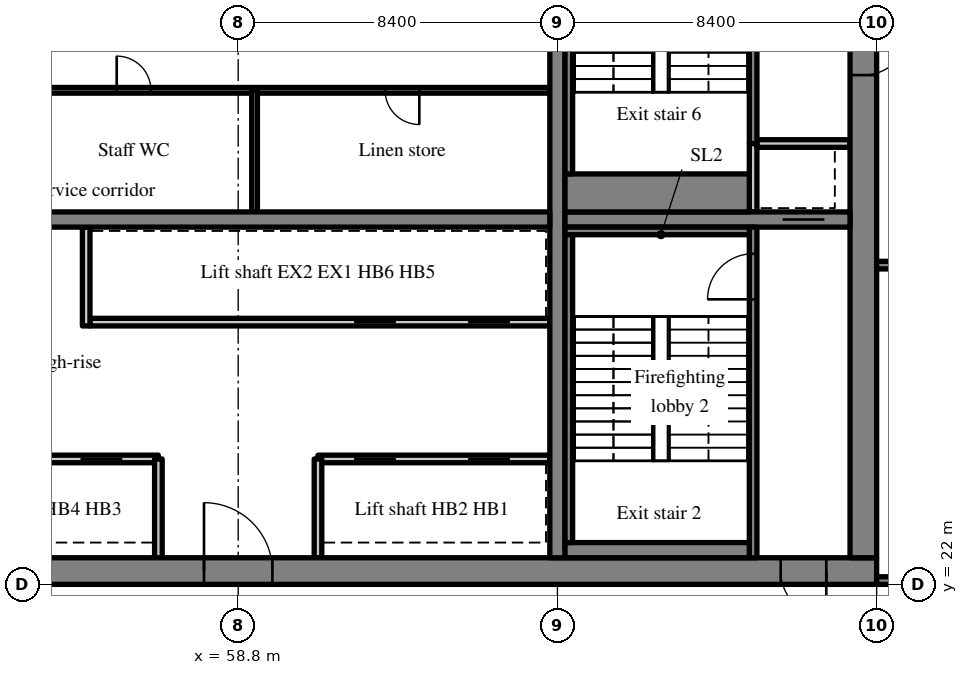
"""IFC4 building model, lengths in metres.
Left out: names, types, materials, properties, quantities, classifications, styles, units other than length and angle.
Written with IfcOpenShell. Run it as: python <this file> out.ifc"""

import sys

from ifc_helpers import new_model, si_unit, direction, frame, frame_2d, origin, place, context, subcontext, project, spatial, rectangle, extrude, source, transform, mapped, element, fill, save


model = new_model("IFC4")
c1 = context("Model", 3, precision=1e-05, world=origin(), true_north=direction((0.0, 1.0)))
c2 = subcontext(c1, "Body", "Model", "MODEL_VIEW")
j1 = project(units=[si_unit("LENGTHUNIT", "METRE"), si_unit("PLANEANGLEUNIT", "RADIAN")], contexts=[c1])
p1 = place(None, origin())
s1 = spatial("IfcSite", under=j1, at=p1, CompositionType="ELEMENT")
p2 = place(p1, origin())
s2 = spatial("IfcBuilding", under=s1, at=p2, CompositionType="ELEMENT")
p3 = place(p2, frame((0.0, 0.0, 151.6)))
s3 = spatial("IfcBuildingStorey", under=s2, at=p3, CompositionType="ELEMENT", Elevation=151.6)
m1 = source(origin(), c2, "Body", "SweptSolid", [
    extrude(rectangle(XDim=50.4, YDim=0.7, at=frame_2d((25.2, 0.0))), origin(), (0.0, 0.0, 1.0), 3.52),
])
p4 = place(p3, frame((25.2, 22.35, 0.0), z_axis=(0.0, 0.0, 1.0), x_axis=(1.0, 0.0, 0.0)))
e1 = element("IfcWall", 1, at=p4, inside=s3, PredefinedType="SHEAR", context=c2, shape_type="MappedRepresentation", body=[
    mapped(m1, transform((0.0, 0.0, 0.0), scale=1.0)),
])
m2 = source(origin(), c2, "Body", "SweptSolid", [
    extrude(rectangle(XDim=1.8, YDim=2.1, at=frame_2d((0.9, 1.05))), frame((0.0, 0.36, 0.0), z_axis=(0.0, -1.0, 0.0), x_axis=(1.0, 0.0, 0.0)), (0.0, 0.0, 1.0), 0.72),
])
p5 = place(p4, frame((15.9, 0.0, 0.0)))
e2 = element("IfcOpeningElement", 2, at=p5, cuts=e1, PredefinedType="OPENING", context=c2, shape_type="MappedRepresentation", body=[
    mapped(m2, transform((0.0, 0.0, 0.0), scale=1.0)),
])
m3 = source(origin(), c2, "Body", "SweptSolid", [
    extrude(rectangle(XDim=0.9, YDim=2.1, at=frame_2d((0.45, 1.05))), frame((0.0, 0.36, 0.0), z_axis=(0.0, -1.0, 0.0), x_axis=(1.0, 0.0, 0.0)), (0.0, 0.0, 1.0), 0.72),
])
p6 = place(p4, frame((21.5, 0.0, 0.0)))
e3 = element("IfcOpeningElement", 3, at=p6, cuts=e1, PredefinedType="OPENING", context=c2, shape_type="MappedRepresentation", body=[
    mapped(m3, transform((0.0, 0.0, 0.0), scale=1.0)),
])
p7 = place(p4, frame((32.7, 0.0, 0.0)))
e4 = element("IfcOpeningElement", 4, at=p7, cuts=e1, PredefinedType="OPENING", context=c2, shape_type="MappedRepresentation", body=[
    mapped(m2, transform((0.0, 0.0, 0.0), scale=1.0)),
])
m4 = source(origin(), c2, "Body", "SweptSolid", [
    extrude(rectangle(XDim=1.2, YDim=2.1, at=frame_2d((0.6, 1.05))), frame((0.0, 0.36, 0.0), z_axis=(0.0, -1.0, 0.0), x_axis=(1.0, 0.0, 0.0)), (0.0, 0.0, 1.0), 0.72),
])
p8 = place(p4, frame((6.475, 0.0, 0.0)))
e5 = element("IfcOpeningElement", 5, at=p8, cuts=e1, PredefinedType="OPENING", context=c2, shape_type="MappedRepresentation", body=[
    mapped(m4, transform((0.0, 0.0, 0.0), scale=1.0)),
])
p9 = place(p4, frame((47.875, 0.0, 0.0)))
e6 = element("IfcOpeningElement", 6, at=p9, cuts=e1, PredefinedType="OPENING", context=c2, shape_type="MappedRepresentation", body=[
    mapped(m4, transform((0.0, 0.0, 0.0), scale=1.0)),
])
m5 = source(origin(), c2, "Body", "SweptSolid", [
    extrude(rectangle(XDim=18.6, YDim=0.7, at=frame_2d((9.3, 0.0))), origin(), (0.0, 0.0, 1.0), 3.52),
])
p10 = place(p3, frame((75.25, 22.7, 0.0), z_axis=(0.0, 0.0, 1.0), x_axis=(0.0, 1.0, 0.0)))
e7 = element("IfcWall", 7, at=p10, inside=s3, PredefinedType="SHEAR", context=c2, shape_type="MappedRepresentation", body=[
    mapped(m5, transform((0.0, 0.0, 0.0), scale=1.0)),
])
p11 = place(p10, frame((12.7, 0.0, 0.0)))
e8 = element("IfcOpeningElement", 8, at=p11, cuts=e7, PredefinedType="OPENING", context=c2, shape_type="MappedRepresentation", body=[
    mapped(m4, transform((0.0, 0.0, 0.0), scale=1.0)),
])
m6 = source(origin(), c2, "Body", "SweptSolid", [
    extrude(rectangle(XDim=18.6, YDim=0.4, at=frame_2d((9.3, 0.0))), origin(), (0.0, 0.0, 1.0), 3.52),
])
p12 = place(p3, frame((67.2, 22.7, 0.0), z_axis=(0.0, 0.0, 1.0), x_axis=(0.0, 1.0, 0.0)))
e9 = element("IfcWall", 9, at=p12, inside=s3, PredefinedType="SHEAR", context=c2, shape_type="MappedRepresentation", body=[
    mapped(m6, transform((0.0, 0.0, 0.0), scale=1.0)),
])
m7 = source(origin(), c2, "Body", "SweptSolid", [
    extrude(rectangle(XDim=16.4, YDim=0.4, at=frame_2d((8.2, 0.0))), origin(), (0.0, 0.0, 1.0), 3.52),
])
p13 = place(p3, frame((50.6, 31.6, 0.0), z_axis=(0.0, 0.0, 1.0), x_axis=(1.0, 0.0, 0.0)))
e10 = element("IfcWall", 10, at=p13, inside=s3, PredefinedType="SHEAR", context=c2, shape_type="MappedRepresentation", body=[
    mapped(m7, transform((0.0, 0.0, 0.0), scale=1.0)),
])
m8 = source(origin(), c2, "Body", "SweptSolid", [
    extrude(rectangle(XDim=1.0, YDim=2.1, at=frame_2d((0.5, 1.05))), frame((0.0, 0.21, 0.0), z_axis=(0.0, -1.0, 0.0), x_axis=(1.0, 0.0, 0.0)), (0.0, 0.0, 1.0), 0.42),
])
p14 = place(p13, frame((0.6, 0.0, 0.0)))
e11 = element("IfcOpeningElement", 11, at=p14, cuts=e10, PredefinedType="OPENING", context=c2, shape_type="MappedRepresentation", body=[
    mapped(m8, transform((0.0, 0.0, 0.0), scale=1.0)),
])
m9 = source(origin(), c2, "Body", "SweptSolid", [
    extrude(rectangle(XDim=7.5, YDim=0.4, at=frame_2d((3.75, 0.0))), origin(), (0.0, 0.0, 1.0), 3.52),
])
p15 = place(p3, frame((67.4, 31.6, 0.0), z_axis=(0.0, 0.0, 1.0), x_axis=(1.0, 0.0, 0.0)))
e12 = element("IfcWall", 12, at=p15, inside=s3, PredefinedType="SHEAR", context=c2, shape_type="MappedRepresentation", body=[
    mapped(m9, transform((0.0, 0.0, 0.0), scale=1.0)),
])
m10 = source(origin(), c2, "Body", "SweptSolid", [
    extrude(rectangle(XDim=1.1, YDim=2.1, at=frame_2d((0.55, 1.05))), frame((0.0, 0.21, 0.0), z_axis=(0.0, -1.0, 0.0), x_axis=(1.0, 0.0, 0.0)), (0.0, 0.0, 1.0), 0.42),
])
p16 = place(p15, frame((5.725, 0.0, 0.0)))
e13 = element("IfcOpeningElement", 13, at=p16, cuts=e12, PredefinedType="OPENING", context=c2, shape_type="MappedRepresentation", body=[
    mapped(m10, transform((0.0, 0.0, 0.0), scale=1.0)),
])
m11 = source(origin(), c2, "Body", "SweptSolid", [
    extrude(rectangle(XDim=6.1, YDim=0.2, at=frame_2d((3.05, 0.0))), origin(), (0.0, 0.0, 1.0), 3.52),
])
p17 = place(p3, frame((67.0, 25.3, 0.0), z_axis=(0.0, 0.0, 1.0), x_axis=(-1.0, 0.0, 0.0)))
e14 = element("IfcWall", 14, at=p17, inside=s3, PredefinedType="SOLIDWALL", context=c2, shape_type="MappedRepresentation", body=[
    mapped(m11, transform((0.0, 0.0, 0.0), scale=1.0)),
])
m12 = source(origin(), c2, "Body", "SweptSolid", [
    extrude(rectangle(XDim=1.1, YDim=2.1, at=frame_2d((0.55, 1.05))), frame((0.0, 0.11, 0.0), z_axis=(0.0, -1.0, 0.0), x_axis=(1.0, 0.0, 0.0)), (0.0, 0.0, 1.0), 0.22),
])
p18 = place(p17, frame((1.05, 0.0, 0.0)))
e15 = element("IfcOpeningElement", 15, at=p18, cuts=e14, PredefinedType="OPENING", context=c2, shape_type="MappedRepresentation", body=[
    mapped(m12, transform((0.0, 0.0, 0.0), scale=1.0)),
])
p19 = place(p17, frame((4.05, 0.0, 0.0)))
e16 = element("IfcOpeningElement", 16, at=p19, cuts=e14, PredefinedType="OPENING", context=c2, shape_type="MappedRepresentation", body=[
    mapped(m12, transform((0.0, 0.0, 0.0), scale=1.0)),
])
m13 = source(origin(), c2, "Body", "SweptSolid", [
    extrude(rectangle(XDim=6.0, YDim=0.2, at=frame_2d((3.0, 0.0))), origin(), (0.0, 0.0, 1.0), 3.52),
])
p20 = place(p3, frame((56.7, 25.3, 0.0), z_axis=(0.0, 0.0, 1.0), x_axis=(-1.0, 0.0, 0.0)))
e17 = element("IfcWall", 17, at=p20, inside=s3, PredefinedType="SOLIDWALL", context=c2, shape_type="MappedRepresentation", body=[
    mapped(m13, transform((0.0, 0.0, 0.0), scale=1.0)),
])
p21 = place(p20, frame((0.95, 0.0, 0.0)))
e18 = element("IfcOpeningElement", 18, at=p21, cuts=e17, PredefinedType="OPENING", context=c2, shape_type="MappedRepresentation", body=[
    mapped(m12, transform((0.0, 0.0, 0.0), scale=1.0)),
])
p22 = place(p20, frame((3.95, 0.0, 0.0)))
e19 = element("IfcOpeningElement", 19, at=p22, cuts=e17, PredefinedType="OPENING", context=c2, shape_type="MappedRepresentation", body=[
    mapped(m12, transform((0.0, 0.0, 0.0), scale=1.0)),
])
m14 = source(origin(), c2, "Body", "SweptSolid", [
    extrude(rectangle(XDim=12.1, YDim=0.2, at=frame_2d((6.05, 0.0))), origin(), (0.0, 0.0, 1.0), 3.52),
])
p23 = place(p3, frame((67.0, 28.9, 0.0), z_axis=(0.0, 0.0, 1.0), x_axis=(-1.0, 0.0, 0.0)))
e20 = element("IfcWall", 20, at=p23, inside=s3, PredefinedType="SOLIDWALL", context=c2, shape_type="MappedRepresentation", body=[
    mapped(m14, transform((0.0, 0.0, 0.0), scale=1.0)),
])
p24 = place(p23, frame((1.05, 0.0, 0.0)))
e21 = element("IfcOpeningElement", 21, at=p24, cuts=e20, PredefinedType="OPENING", context=c2, shape_type="MappedRepresentation", body=[
    mapped(m12, transform((0.0, 0.0, 0.0), scale=1.0)),
])
p25 = place(p23, frame((4.05, 0.0, 0.0)))
e22 = element("IfcOpeningElement", 22, at=p25, cuts=e20, PredefinedType="OPENING", context=c2, shape_type="MappedRepresentation", body=[
    mapped(m12, transform((0.0, 0.0, 0.0), scale=1.0)),
])
m15 = source(origin(), c2, "Body", "SweptSolid", [
    extrude(rectangle(XDim=2.6, YDim=0.2, at=frame_2d((1.3, 0.0))), origin(), (0.0, 0.0, 1.0), 3.52),
])
for number, where, z_axis, x_axis in (
    (23, (60.9, 22.7, 0.0), (0.0, 0.0, 1.0), (0.0, 1.0, 0.0)),
    (24, (56.7, 22.7, 0.0), (0.0, 0.0, 1.0), (0.0, 1.0, 0.0)),
):
    element("IfcWall", number, at=place(p3, frame(where, z_axis=z_axis, x_axis=x_axis)), inside=s3, PredefinedType="SOLIDWALL", context=c2, shape_type="MappedRepresentation", body=[
        mapped(m15, transform((0.0, 0.0, 0.0), scale=1.0)),
    ])
m16 = source(origin(), c2, "Body", "SweptSolid", [
    extrude(rectangle(XDim=2.6, YDim=0.2, at=frame_2d((1.3, 0.0))), origin(), (0.0, 0.0, 1.0), 3.52),
])
p26 = place(p3, frame((54.8, 28.8, 0.0), z_axis=(0.0, 0.0, 1.0), x_axis=(0.0, 1.0, 0.0)))
e25 = element("IfcWall", 25, at=p26, inside=s3, PredefinedType="SOLIDWALL", context=c2, shape_type="MappedRepresentation", body=[
    mapped(m16, transform((0.0, 0.0, 0.0), scale=1.0)),
])
m17 = source(origin(), c2, "Body", "SweptSolid", [
    extrude(rectangle(XDim=14.2, YDim=0.15, at=frame_2d((7.1, 0.0))), origin(), (0.0, 0.0, 1.0), 3.52),
])
p27 = place(p3, frame((67.0, 35.0, 0.0), z_axis=(0.0, 0.0, 1.0), x_axis=(-1.0, 0.0, 0.0)))
e26 = element("IfcWall", 26, at=p27, inside=s3, PredefinedType="PARTITIONING", context=c2, shape_type="MappedRepresentation", body=[
    mapped(m17, transform((0.0, 0.0, 0.0), scale=1.0)),
])
m18 = source(origin(), c2, "Body", "SweptSolid", [
    extrude(rectangle(XDim=0.9, YDim=2.1, at=frame_2d((0.45, 1.05))), frame((0.0, 0.085, 0.0), z_axis=(0.0, -1.0, 0.0), x_axis=(1.0, 0.0, 0.0)), (0.0, 0.0, 1.0), 0.17),
])
p28 = place(p27, frame((3.434, 0.0, 0.0)))
e27 = element("IfcOpeningElement", 27, at=p28, cuts=e26, PredefinedType="OPENING", context=c2, shape_type="MappedRepresentation", body=[
    mapped(m18, transform((0.0, 0.0, 0.0), scale=1.0)),
])
p29 = place(p27, frame((10.497, 0.0, 0.0)))
e28 = element("IfcOpeningElement", 28, at=p29, cuts=e26, PredefinedType="OPENING", context=c2, shape_type="MappedRepresentation", body=[
    mapped(m18, transform((0.0, 0.0, 0.0), scale=1.0)),
])
m19 = source(origin(), c2, "Body", "SweptSolid", [
    extrude(rectangle(XDim=3.2, YDim=0.15, at=frame_2d((1.6, 0.0))), origin(), (0.0, 0.0, 1.0), 3.52),
])
p30 = place(p3, frame((59.231, 31.8, 0.0), z_axis=(0.0, 0.0, 1.0), x_axis=(0.0, 1.0, 0.0)))
e29 = element("IfcWall", 29, at=p30, inside=s3, PredefinedType="PARTITIONING", context=c2, shape_type="MappedRepresentation", body=[
    mapped(m19, transform((0.0, 0.0, 0.0), scale=1.0)),
])
m20 = source(origin(), c2, "Body", "SweptSolid", [
    extrude(rectangle(XDim=8.7, YDim=0.2, at=frame_2d((4.35, 0.0))), origin(), (0.0, 0.0, 1.0), 3.52),
])
p31 = place(p3, frame((72.35, 22.7, 0.0), z_axis=(0.0, 0.0, 1.0), x_axis=(0.0, 1.0, 0.0)))
e30 = element("IfcWall", 30, at=p31, inside=s3, PredefinedType="SOLIDWALL", context=c2, shape_type="MappedRepresentation", body=[
    mapped(m20, transform((0.0, 0.0, 0.0), scale=1.0)),
])
m21 = source(origin(), c2, "Body", "SweptSolid", [
    extrude(rectangle(XDim=1.2, YDim=2.1, at=frame_2d((0.6, 1.05))), frame((0.0, 0.11, 0.0), z_axis=(0.0, -1.0, 0.0), x_axis=(1.0, 0.0, 0.0)), (0.0, 0.0, 1.0), 0.22),
])
p32 = place(p31, frame((6.8, 0.0, 0.0)))
e31 = element("IfcOpeningElement", 31, at=p32, cuts=e30, PredefinedType="OPENING", context=c2, shape_type="MappedRepresentation", body=[
    mapped(m21, transform((0.0, 0.0, 0.0), scale=1.0)),
])
m22 = source(origin(), c2, "Body", "SweptSolid", [
    extrude(rectangle(XDim=1.8, YDim=0.2, at=frame_2d((0.9, 0.0))), origin(), (0.0, 0.0, 1.0), 3.52),
])
p33 = place(p3, frame((72.35, 31.8, 0.0), z_axis=(0.0, 0.0, 1.0), x_axis=(0.0, 1.0, 0.0)))
e32 = element("IfcWall", 32, at=p33, inside=s3, PredefinedType="SOLIDWALL", context=c2, shape_type="MappedRepresentation", body=[
    mapped(m22, transform((0.0, 0.0, 0.0), scale=1.0)),
])
m23 = source(origin(), c2, "Body", "SweptSolid", [
    extrude(rectangle(XDim=2.45, YDim=0.2, at=frame_2d((1.225, 0.0))), origin(), (0.0, 0.0, 1.0), 3.52),
])
p34 = place(p3, frame((72.45, 33.6, 0.0), z_axis=(0.0, 0.0, 1.0), x_axis=(1.0, 0.0, 0.0)))
e33 = element("IfcWall", 33, at=p34, inside=s3, PredefinedType="SOLIDWALL", context=c2, shape_type="MappedRepresentation", body=[
    mapped(m23, transform((0.0, 0.0, 0.0), scale=1.0)),
])
m24 = source(origin(), c2, "Body", "SweptSolid", [
    extrude(rectangle(XDim=7.7, YDim=0.2, at=frame_2d((3.85, 0.0))), origin(), (0.0, 0.0, 1.0), 3.52),
])
p35 = place(p3, frame((72.35, 33.6, 0.0), z_axis=(0.0, 0.0, 1.0), x_axis=(0.0, 1.0, 0.0)))
e34 = element("IfcWall", 34, at=p35, inside=s3, PredefinedType="SOLIDWALL", context=c2, shape_type="MappedRepresentation", body=[
    mapped(m24, transform((0.0, 0.0, 0.0), scale=1.0)),
])
m25 = source(origin(), c2, "Body", "SweptSolid", [
    extrude(rectangle(XDim=1.8, YDim=2.1, at=frame_2d((0.9, 1.05))), frame((0.0, 0.11, 0.0), z_axis=(0.0, -1.0, 0.0), x_axis=(1.0, 0.0, 0.0)), (0.0, 0.0, 1.0), 0.22),
])
p36 = place(p35, frame((5.3, 0.0, 0.0)))
e35 = element("IfcOpeningElement", 35, at=p36, cuts=e34, PredefinedType="OPENING", context=c2, shape_type="MappedRepresentation", body=[
    mapped(m25, transform((0.0, 0.0, 0.0), scale=1.0)),
])
m26 = source(origin(), c2, "Body", "SweptSolid", [
    extrude(rectangle(XDim=8.25, YDim=0.2, at=frame_2d((4.125, 0.0))), origin(), (0.0, 0.0, 1.0), 3.52),
])
p37 = place(p3, frame((83.85, 22.1, 0.0), z_axis=(0.0, 0.0, 1.0), x_axis=(-1.0, 0.0, 0.0)))
e36 = element("IfcWall", 36, at=p37, inside=s3, PredefinedType="SOLIDWALL", context=c2, shape_type="MappedRepresentation", body=[
    mapped(m26, transform((0.0, 0.0, 0.0), scale=1.0)),
])
p38 = place(p37, frame((6.05, 0.0, 0.0)))
e37 = element("IfcOpeningElement", 37, at=p38, cuts=e36, PredefinedType="OPENING", context=c2, shape_type="MappedRepresentation", body=[
    mapped(m21, transform((0.0, 0.0, 0.0), scale=1.0)),
])
p39 = place(p3, frame((83.85, 30.4, 0.0), z_axis=(0.0, 0.0, 1.0), x_axis=(-1.0, 0.0, 0.0)))
e38 = element("IfcWall", 38, at=p39, inside=s3, PredefinedType="SOLIDWALL", context=c2, shape_type="MappedRepresentation", body=[
    mapped(m26, transform((0.0, 0.0, 0.0), scale=1.0)),
])
m27 = source(origin(), c2, "Body", "SweptSolid", [
    extrude(rectangle(XDim=1.0, YDim=2.1, at=frame_2d((0.5, 1.05))), frame((0.0, 0.11, 0.0), z_axis=(0.0, -1.0, 0.0), x_axis=(1.0, 0.0, 0.0)), (0.0, 0.0, 1.0), 0.22),
])
p40 = place(p39, frame((6.15, 0.0, 0.0)))
e39 = element("IfcOpeningElement", 39, at=p40, cuts=e38, PredefinedType="OPENING", context=c2, shape_type="MappedRepresentation", body=[
    mapped(m27, transform((0.0, 0.0, 0.0), scale=1.0)),
])
m28 = source(origin(), c2, "Body", "SweptSolid", [
    extrude(rectangle(XDim=4.85, YDim=0.4, at=frame_2d((2.425, 0.0))), origin(), (0.0, 0.0, 1.0), 3.52),
])
p41 = place(p3, frame((67.4, 22.9, 0.0), z_axis=(0.0, 0.0, 1.0), x_axis=(1.0, 0.0, 0.0)))
e40 = element("IfcWall", 40, at=p41, inside=s3, PredefinedType="SOLIDWALL", context=c2, shape_type="MappedRepresentation", body=[
    mapped(m28, transform((0.0, 0.0, 0.0), scale=1.0)),
])
m29 = source(origin(), c2, "Body", "SweptSolid", [
    extrude(rectangle(XDim=4.85, YDim=0.2, at=frame_2d((2.425, 0.0))), origin(), (0.0, 0.0, 1.0), 3.52),
])
p42 = place(p3, frame((67.4, 31.3, 0.0), z_axis=(0.0, 0.0, 1.0), x_axis=(1.0, 0.0, 0.0)))
e41 = element("IfcWall", 41, at=p42, inside=s3, PredefinedType="SOLIDWALL", context=c2, shape_type="MappedRepresentation", body=[
    mapped(m29, transform((0.0, 0.0, 0.0), scale=1.0)),
])
m30 = source(origin(), c2, "Body", "SweptSolid", [
    extrude(rectangle(XDim=8.1, YDim=0.2, at=frame_2d((4.05, 0.0))), origin(), (0.0, 0.0, 1.0), 3.52),
])
p43 = place(p3, frame((67.5, 23.1, 0.0), z_axis=(0.0, 0.0, 1.0), x_axis=(0.0, 1.0, 0.0)))
e42 = element("IfcWall", 42, at=p43, inside=s3, PredefinedType="SOLIDWALL", context=c2, shape_type="MappedRepresentation", body=[
    mapped(m30, transform((0.0, 0.0, 0.0), scale=1.0)),
])
m31 = source(origin(), c2, "Body", "SweptSolid", [
    extrude(rectangle(XDim=4.85, YDim=1.0, at=frame_2d((2.425, 0.0))), origin(), (0.0, 0.0, 1.0), 3.52),
])
p44 = place(p3, frame((67.4, 32.3, 0.0), z_axis=(0.0, 0.0, 1.0), x_axis=(1.0, 0.0, 0.0)))
e43 = element("IfcWall", 43, at=p44, inside=s3, PredefinedType="SOLIDWALL", context=c2, shape_type="MappedRepresentation", body=[
    mapped(m31, transform((0.0, 0.0, 0.0), scale=1.0)),
])
p45 = place(p3, frame((67.5, 32.8, 0.0), z_axis=(0.0, 0.0, 1.0), x_axis=(0.0, 1.0, 0.0)))
e44 = element("IfcWall", 44, at=p45, inside=s3, PredefinedType="SOLIDWALL", context=c2, shape_type="MappedRepresentation", body=[
    mapped(m30, transform((0.0, 0.0, 0.0), scale=1.0)),
])
m32 = source(origin(), c2, "Body", "SweptSolid", [
    extrude(rectangle(XDim=1.8, YDim=2.1, at=frame_2d((0.9, 1.05))), frame((0.0, 0.275, 0.0), z_axis=(0.0, -1.0, 0.0), x_axis=(1.0, 0.0, 0.0)), (0.0, 0.0, 1.0), 0.05),
])
p46 = place(p7, origin())
e45 = element("IfcDoor", 45, at=p46, inside=s3, OperationType="DOUBLE_DOOR_SINGLE_SWING", PredefinedType="DOOR", context=c2, shape_type="MappedRepresentation", body=[
    mapped(m32, transform((0.0, 0.0, 0.0), scale=1.0)),
])
fill(e4, e45)
m33 = source(origin(), c2, "Body", "SweptSolid", [
    extrude(rectangle(XDim=1.1, YDim=2.1, at=frame_2d((0.55, 1.05))), frame((0.0, 0.025, 0.0), z_axis=(0.0, -1.0, 0.0), x_axis=(1.0, 0.0, 0.0)), (0.0, 0.0, 1.0), 0.05),
])
p47 = place(p18, origin())
e46 = element("IfcDoor", 46, at=p47, inside=s3, OperationType="SLIDING_TO_RIGHT", PredefinedType="DOOR", context=c2, shape_type="MappedRepresentation", body=[
    mapped(m33, transform((0.0, 0.0, 0.0), scale=1.0)),
])
fill(e15, e46)
p48 = place(p19, origin())
e47 = element("IfcDoor", 47, at=p48, inside=s3, OperationType="SLIDING_TO_LEFT", PredefinedType="DOOR", context=c2, shape_type="MappedRepresentation", body=[
    mapped(m33, transform((0.0, 0.0, 0.0), scale=1.0)),
])
fill(e16, e47)
p49 = place(p21, origin())
e48 = element("IfcDoor", 48, at=p49, inside=s3, OperationType="SLIDING_TO_RIGHT", PredefinedType="DOOR", context=c2, shape_type="MappedRepresentation", body=[
    mapped(m33, transform((0.0, 0.0, 0.0), scale=1.0)),
])
fill(e18, e48)
p50 = place(p24, origin())
e49 = element("IfcDoor", 49, at=p50, inside=s3, OperationType="SLIDING_TO_RIGHT", PredefinedType="DOOR", context=c2, shape_type="MappedRepresentation", body=[
    mapped(m33, transform((0.0, 0.0, 0.0), scale=1.0)),
])
fill(e21, e49)
p51 = place(p25, origin())
e50 = element("IfcDoor", 50, at=p51, inside=s3, OperationType="SLIDING_TO_LEFT", PredefinedType="DOOR", context=c2, shape_type="MappedRepresentation", body=[
    mapped(m33, transform((0.0, 0.0, 0.0), scale=1.0)),
])
fill(e22, e50)
m34 = source(origin(), c2, "Body", "SweptSolid", [
    extrude(rectangle(XDim=0.9, YDim=2.1, at=frame_2d((0.45, 1.05))), frame((0.0, 0.025, 0.0), z_axis=(0.0, -1.0, 0.0), x_axis=(1.0, 0.0, 0.0)), (0.0, 0.0, 1.0), 0.05),
])
p52 = place(p28, origin())
e51 = element("IfcDoor", 51, at=p52, inside=s3, OperationType="SINGLE_SWING_LEFT", PredefinedType="DOOR", context=c2, shape_type="MappedRepresentation", body=[
    mapped(m34, transform((0.0, 0.0, 0.0), scale=1.0)),
])
fill(e27, e51)
p53 = place(p29, origin())
e52 = element("IfcDoor", 52, at=p53, inside=s3, OperationType="SINGLE_SWING_RIGHT", PredefinedType="DOOR", context=c2, shape_type="MappedRepresentation", body=[
    mapped(m34, transform((0.0, 0.0, 0.0), scale=1.0)),
])
fill(e28, e52)
m35 = source(origin(), c2, "Body", "SweptSolid", [
    extrude(rectangle(XDim=1.2, YDim=2.1, at=frame_2d((0.6, 1.05))), frame((0.0, 0.025, 0.0), z_axis=(0.0, -1.0, 0.0), x_axis=(1.0, 0.0, 0.0)), (0.0, 0.0, 1.0), 0.05),
])
p54 = place(p32, origin())
e53 = element("IfcDoor", 53, at=p54, inside=s3, OperationType="SINGLE_SWING_LEFT", PredefinedType="DOOR", context=c2, shape_type="MappedRepresentation", body=[
    mapped(m35, transform((0.0, 0.0, 0.0), scale=1.0)),
])
fill(e31, e53)
m36 = source(origin(), c2, "Body", "SweptSolid", [
    extrude(rectangle(XDim=1.2, YDim=2.1, at=frame_2d((0.6, 1.05))), frame((0.0, 0.275, 0.0), z_axis=(0.0, -1.0, 0.0), x_axis=(1.0, 0.0, 0.0)), (0.0, 0.0, 1.0), 0.05),
])
p55 = place(p9, origin())
e54 = element("IfcDoor", 54, at=p55, inside=s3, OperationType="SINGLE_SWING_RIGHT", PredefinedType="DOOR", context=c2, shape_type="MappedRepresentation", body=[
    mapped(m36, transform((0.0, 0.0, 0.0), scale=1.0)),
])
fill(e6, e54)
p56 = place(p16, origin())
e55 = element("IfcDoor", 55, at=p56, inside=s3, OperationType="SLIDING_TO_RIGHT", PredefinedType="DOOR", context=c2, shape_type="MappedRepresentation", body=[
    mapped(m33, transform((0.0, 0.0, 0.0), scale=1.0)),
])
fill(e13, e55)
p57 = place(p11, origin())
e56 = element("IfcDoor", 56, at=p57, inside=s3, OperationType="SINGLE_SWING_RIGHT", PredefinedType="DOOR", context=c2, shape_type="MappedRepresentation", body=[
    mapped(m35, transform((0.0, 0.0, 0.0), scale=1.0)),
])
fill(e8, e56)
save(model, sys.argv[1])
